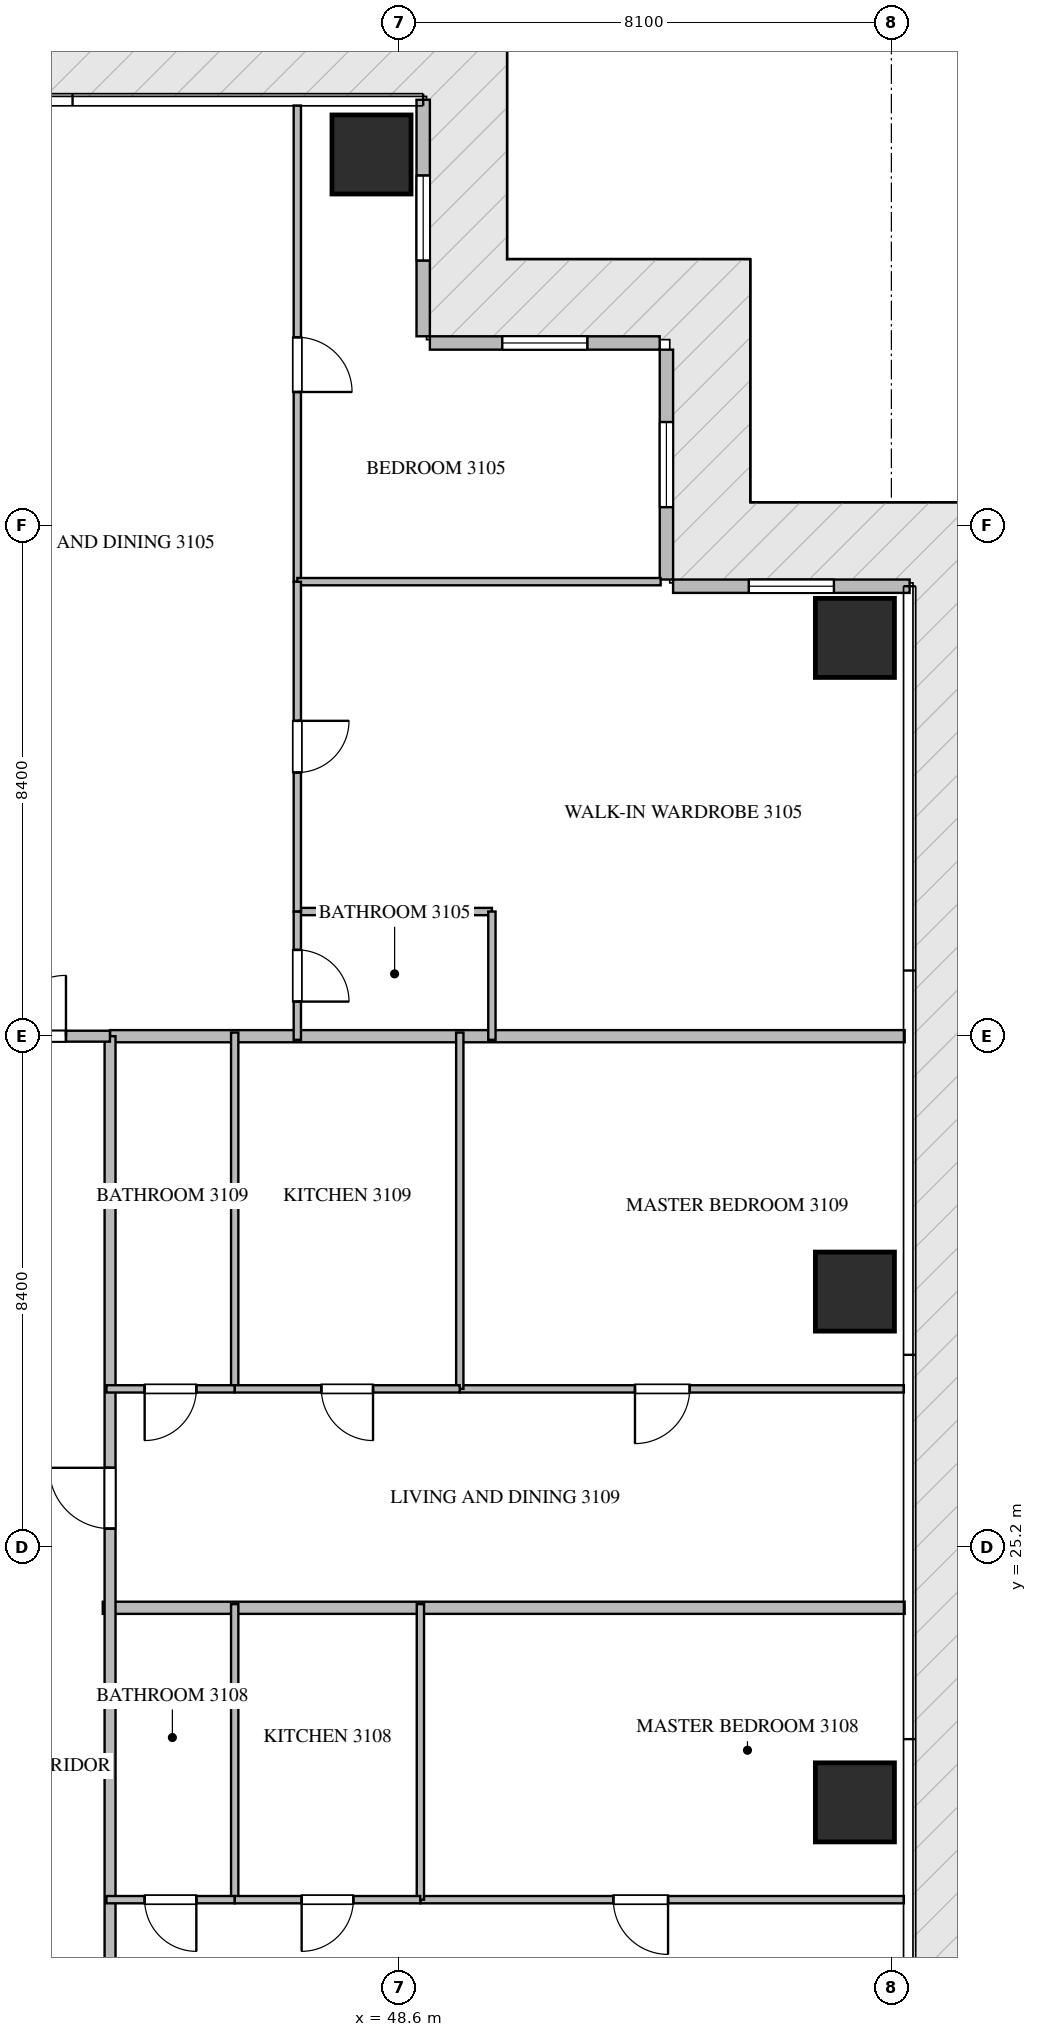
"""IFC4 building model, lengths in metres.
Left out: names, types, materials, properties, quantities, classifications, styles, units other than length and angle.
Written with IfcOpenShell. Run it as: python <this file> out.ifc"""

import sys

from ifc_helpers import new_model, si_unit, direction, frame, frame_2d, origin, origin_2d, place, context, subcontext, project, spatial, rectangle, extrude, source, transform, mapped, element, fill, save


model = new_model("IFC4")
c1 = context("Model", 3, precision=1e-05, world=origin(), true_north=direction((0.0, 1.0)))
c2 = subcontext(c1, "Body", "Model", "MODEL_VIEW")
j1 = project(units=[si_unit("LENGTHUNIT", "METRE"), si_unit("PLANEANGLEUNIT", "RADIAN")], contexts=[c1])
p1 = place(None, origin())
s1 = spatial("IfcSite", under=j1, at=p1, CompositionType="ELEMENT")
p2 = place(p1, origin())
s2 = spatial("IfcBuilding", under=s1, at=p2, CompositionType="ELEMENT")
p3 = place(p2, frame((0.0, 0.0, 127.65)))
s3 = spatial("IfcBuildingStorey", under=s2, at=p3, CompositionType="ELEMENT", Elevation=127.65)
m1 = source(origin(), c2, "Body", "SweptSolid", [
    extrude(rectangle(XDim=1.3, YDim=1.3, at=origin_2d()), origin(), (0.0, 0.0, 1.0), 3.75),
])
for number, where, z_axis, x_axis in (
    (1, (48.15, 48.1, -0.26), (0.0, 0.0, 1.0), (1.0, 0.0, 0.0)),
    (2, (56.1, 21.0, -0.26), (0.0, 0.0, 1.0), (1.0, 0.0, 0.0)),
    (3, (56.1, 29.4, -0.26), (0.0, 0.0, 1.0), (1.0, 0.0, 0.0)),
    (4, (56.1, 40.15, -0.26), (0.0, 0.0, 1.0), (1.0, 0.0, 0.0)),
):
    element("IfcColumn", number, at=place(p3, frame(where, z_axis=z_axis, x_axis=x_axis)), inside=s3, PredefinedType="COLUMN", context=c2, shape_type="MappedRepresentation", body=[
        mapped(m1, transform((0.0, 0.0, 0.0), scale=1.0)),
    ])
p4 = place(p3, frame((57.0, 41.0, 0.0), z_axis=(0.0, 0.0, 1.0), x_axis=(-1.0, 0.0, 0.0)))
e5 = element("IfcWall", 5, at=p4, inside=s3, PredefinedType="ELEMENTEDWALL", context=c2, shape_type="SweptSolid", body=[
    extrude(rectangle(XDim=3.89, YDim=0.22, at=frame_2d((1.945, 0.0))), origin(), (0.0, 0.0, 1.0), 3.475),
])
p5 = place(p4, frame((1.245, 0.0, 0.65)))
e6 = element("IfcOpeningElement", 6, at=p5, cuts=e5, PredefinedType="OPENING", context=c2, shape_type="SweptSolid", body=[
    extrude(rectangle(XDim=1.4, YDim=2.05, at=frame_2d((0.7, 1.025))), frame((0.0, 0.12, 0.0), z_axis=(0.0, -1.0, 0.0), x_axis=(1.0, 0.0, 0.0)), (0.0, 0.0, 1.0), 0.24),
])
p6 = place(p3, frame((53.0, 41.11, 0.0), z_axis=(0.0, 0.0, 1.0), x_axis=(0.0, 1.0, 0.0)))
e7 = element("IfcWall", 7, at=p6, inside=s3, PredefinedType="ELEMENTEDWALL", context=c2, shape_type="SweptSolid", body=[
    extrude(rectangle(XDim=3.78, YDim=0.22, at=frame_2d((1.89, 0.0))), origin(), (0.0, 0.0, 1.0), 3.475),
])
p7 = place(p6, frame((1.19, 0.0, 0.65)))
e8 = element("IfcOpeningElement", 8, at=p7, cuts=e7, PredefinedType="OPENING", context=c2, shape_type="SweptSolid", body=[
    extrude(rectangle(XDim=1.4, YDim=2.05, at=frame_2d((0.7, 1.025))), frame((0.0, 0.12, 0.0), z_axis=(0.0, -1.0, 0.0), x_axis=(1.0, 0.0, 0.0)), (0.0, 0.0, 1.0), 0.24),
])
p8 = place(p3, frame((52.89, 45.0, 0.0), z_axis=(0.0, 0.0, 1.0), x_axis=(-1.0, 0.0, 0.0)))
e9 = element("IfcWall", 9, at=p8, inside=s3, PredefinedType="ELEMENTEDWALL", context=c2, shape_type="SweptSolid", body=[
    extrude(rectangle(XDim=3.78, YDim=0.22, at=frame_2d((1.89, 0.0))), origin(), (0.0, 0.0, 1.0), 3.475),
])
p9 = place(p8, frame((1.19, 0.0, 0.65)))
e10 = element("IfcOpeningElement", 10, at=p9, cuts=e9, PredefinedType="OPENING", context=c2, shape_type="SweptSolid", body=[
    extrude(rectangle(XDim=1.4, YDim=2.05, at=frame_2d((0.7, 1.025))), frame((0.0, 0.12, 0.0), z_axis=(0.0, -1.0, 0.0), x_axis=(1.0, 0.0, 0.0)), (0.0, 0.0, 1.0), 0.24),
])
p10 = place(p3, frame((49.0, 45.11, 0.0), z_axis=(0.0, 0.0, 1.0), x_axis=(0.0, 1.0, 0.0)))
e11 = element("IfcWall", 11, at=p10, inside=s3, PredefinedType="ELEMENTEDWALL", context=c2, shape_type="SweptSolid", body=[
    extrude(rectangle(XDim=3.89, YDim=0.22, at=frame_2d((1.945, 0.0))), origin(), (0.0, 0.0, 1.0), 3.475),
])
p11 = place(p10, frame((1.245, 0.0, 0.65)))
e12 = element("IfcOpeningElement", 12, at=p11, cuts=e11, PredefinedType="OPENING", context=c2, shape_type="SweptSolid", body=[
    extrude(rectangle(XDim=1.4, YDim=2.05, at=frame_2d((0.7, 1.025))), frame((0.0, 0.12, 0.0), z_axis=(0.0, -1.0, 0.0), x_axis=(1.0, 0.0, 0.0)), (0.0, 0.0, 1.0), 0.24),
])
p12 = place(p3, frame((43.73, 24.2, 0.0), z_axis=(0.0, 0.0, 1.0), x_axis=(1.0, 0.0, 0.0)))
e13 = element("IfcWall", 13, at=p12, inside=s3, PredefinedType="PARTITIONING", context=c2, shape_type="SweptSolid", body=[
    extrude(rectangle(XDim=13.188, YDim=0.2, at=frame_2d((6.594, 0.0))), origin(), (0.0, 0.0, 1.0), 3.49),
])
p13 = place(p3, frame((43.85, 33.6, 0.0), z_axis=(0.0, 0.0, 1.0), x_axis=(1.0, 0.0, 0.0)))
e14 = element("IfcWall", 14, at=p13, inside=s3, PredefinedType="PARTITIONING", context=c2, shape_type="SweptSolid", body=[
    extrude(rectangle(XDim=13.068, YDim=0.2, at=frame_2d((6.534, 0.0))), origin(), (0.0, 0.0, 1.0), 3.49),
])
p14 = place(p3, frame((43.85, 14.9, 0.0), z_axis=(0.0, 0.0, 1.0), x_axis=(0.0, 1.0, 0.0)))
e15 = element("IfcWall", 15, at=p14, inside=s3, PredefinedType="PARTITIONING", context=c2, shape_type="SweptSolid", body=[
    extrude(rectangle(XDim=18.7, YDim=0.18, at=frame_2d((9.35, 0.0))), origin(), (0.0, 0.0, 1.0), 3.49),
])
p15 = place(p14, frame((1.805, 0.0, 0.0)))
e16 = element("IfcOpeningElement", 16, at=p15, cuts=e15, PredefinedType="OPENING", context=c2, shape_type="SweptSolid", body=[
    extrude(rectangle(XDim=1.0, YDim=2.15, at=frame_2d((0.5, 1.075))), frame((0.0, 0.1, 0.0), z_axis=(0.0, -1.0, 0.0), x_axis=(1.0, 0.0, 0.0)), (0.0, 0.0, 1.0), 0.2),
])
p16 = place(p14, frame((10.602, 0.0, 0.0)))
e17 = element("IfcOpeningElement", 17, at=p16, cuts=e15, PredefinedType="OPENING", context=c2, shape_type="SweptSolid", body=[
    extrude(rectangle(XDim=1.0, YDim=2.15, at=frame_2d((0.5, 1.075))), frame((0.0, 0.1, 0.0), z_axis=(0.0, -1.0, 0.0), x_axis=(1.0, 0.0, 0.0)), (0.0, 0.0, 1.0), 0.2),
])
p17 = place(p3, frame((41.402, 33.6, 0.0), z_axis=(0.0, 0.0, 1.0), x_axis=(1.0, 0.0, 0.0)))
e18 = element("IfcWall", 18, at=p17, inside=s3, PredefinedType="PARTITIONING", context=c2, shape_type="SweptSolid", body=[
    extrude(rectangle(XDim=2.446, YDim=0.18, at=frame_2d((1.223, 0.0))), origin(), (0.0, 0.0, 1.0), 3.49),
])
p18 = place(p17, frame((0.723, 0.0, 0.0)))
e19 = element("IfcOpeningElement", 19, at=p18, cuts=e18, PredefinedType="OPENING", context=c2, shape_type="SweptSolid", body=[
    extrude(rectangle(XDim=1.0, YDim=2.15, at=frame_2d((0.5, 1.075))), frame((0.0, 0.1, 0.0), z_axis=(0.0, -1.0, 0.0), x_axis=(1.0, 0.0, 0.0)), (0.0, 0.0, 1.0), 0.2),
])
p19 = place(p3, frame((46.93, 48.905, 0.0), z_axis=(0.0, 0.0, 1.0), x_axis=(0.0, -1.0, 0.0)))
e20 = element("IfcWall", 20, at=p19, inside=s3, PredefinedType="PARTITIONING", context=c2, shape_type="SweptSolid", body=[
    extrude(rectangle(XDim=7.83, YDim=0.12, at=frame_2d((3.915, 0.0))), origin(), (0.0, 0.0, 1.0), 3.49),
])
p20 = place(p19, frame((3.811, 0.0, 0.0)))
e21 = element("IfcOpeningElement", 21, at=p20, cuts=e20, PredefinedType="OPENING", context=c2, shape_type="SweptSolid", body=[
    extrude(rectangle(XDim=0.9, YDim=2.1, at=frame_2d((0.45, 1.05))), frame((0.0, 0.07, 0.0), z_axis=(0.0, -1.0, 0.0), x_axis=(1.0, 0.0, 0.0)), (0.0, 0.0, 1.0), 0.14),
])
p21 = place(p3, frame((46.93, 41.075, 0.0), z_axis=(0.0, 0.0, 1.0), x_axis=(1.0, 0.0, 0.0)))
e22 = element("IfcWall", 22, at=p21, inside=s3, PredefinedType="PARTITIONING", context=c2, shape_type="SweptSolid", body=[
    extrude(rectangle(XDim=5.975, YDim=0.12, at=frame_2d((2.988, 0.0))), origin(), (0.0, 0.0, 1.0), 3.49),
])
p22 = place(p3, frame((46.93, 35.65, 0.0), z_axis=(0.0, 0.0, 1.0), x_axis=(1.0, 0.0, 0.0)))
e23 = element("IfcWall", 23, at=p22, inside=s3, PredefinedType="PARTITIONING", context=c2, shape_type="SweptSolid", body=[
    extrude(rectangle(XDim=3.2, YDim=0.12, at=frame_2d((1.6, 0.0))), origin(), (0.0, 0.0, 1.0), 3.49),
])
p23 = place(p3, frame((50.13, 35.65, 0.0), z_axis=(0.0, 0.0, 1.0), x_axis=(0.0, -1.0, 0.0)))
e24 = element("IfcWall", 24, at=p23, inside=s3, PredefinedType="PARTITIONING", context=c2, shape_type="SweptSolid", body=[
    extrude(rectangle(XDim=2.11, YDim=0.12, at=frame_2d((1.055, 0.0))), origin(), (0.0, 0.0, 1.0), 3.49),
])
p24 = place(p3, frame((46.93, 41.073, 0.0), z_axis=(0.0, 0.0, 1.0), x_axis=(0.0, -1.0, 0.0)))
e25 = element("IfcWall", 25, at=p24, inside=s3, PredefinedType="PARTITIONING", context=c2, shape_type="SweptSolid", body=[
    extrude(rectangle(XDim=5.423, YDim=0.12, at=frame_2d((2.711, 0.0))), origin(), (0.0, 0.0, 1.0), 3.49),
])
p25 = place(p24, frame((2.287, 0.0, 0.0)))
e26 = element("IfcOpeningElement", 26, at=p25, cuts=e25, PredefinedType="OPENING", context=c2, shape_type="SweptSolid", body=[
    extrude(rectangle(XDim=0.85, YDim=2.1, at=frame_2d((0.425, 1.05))), frame((0.0, 0.07, 0.0), z_axis=(0.0, -1.0, 0.0), x_axis=(1.0, 0.0, 0.0)), (0.0, 0.0, 1.0), 0.14),
])
p26 = place(p3, frame((46.93, 35.648, 0.0), z_axis=(0.0, 0.0, 1.0), x_axis=(0.0, -1.0, 0.0)))
e27 = element("IfcWall", 27, at=p26, inside=s3, PredefinedType="PARTITIONING", context=c2, shape_type="SweptSolid", body=[
    extrude(rectangle(XDim=2.108, YDim=0.12, at=frame_2d((1.054, 0.0))), origin(), (0.0, 0.0, 1.0), 3.49),
])
p27 = place(p26, frame((0.629, 0.0, 0.0)))
e28 = element("IfcOpeningElement", 28, at=p27, cuts=e27, PredefinedType="OPENING", context=c2, shape_type="SweptSolid", body=[
    extrude(rectangle(XDim=0.85, YDim=2.1, at=frame_2d((0.425, 1.05))), frame((0.0, 0.07, 0.0), z_axis=(0.0, -1.0, 0.0), x_axis=(1.0, 0.0, 0.0)), (0.0, 0.0, 1.0), 0.14),
])
p28 = place(p3, frame((56.905, 19.4, 0.0), z_axis=(0.0, 0.0, 1.0), x_axis=(-1.0, 0.0, 0.0)))
e29 = element("IfcWall", 29, at=p28, inside=s3, PredefinedType="PARTITIONING", context=c2, shape_type="SweptSolid", body=[
    extrude(rectangle(XDim=7.951, YDim=0.12, at=frame_2d((3.976, 0.0))), origin(), (0.0, 0.0, 1.0), 3.49),
])
p29 = place(p28, frame((3.878, 0.0, 0.0)))
e30 = element("IfcOpeningElement", 30, at=p29, cuts=e29, PredefinedType="OPENING", context=c2, shape_type="SweptSolid", body=[
    extrude(rectangle(XDim=0.9, YDim=2.1, at=frame_2d((0.45, 1.05))), frame((0.0, 0.07, 0.0), z_axis=(0.0, -1.0, 0.0), x_axis=(1.0, 0.0, 0.0)), (0.0, 0.0, 1.0), 0.14),
])
for number, where, z_axis, x_axis in (
    (31, (48.954, 19.4, 0.0), (0.0, 0.0, 1.0), (0.0, 1.0, 0.0)),
    (32, (45.9, 19.4, 0.0), (0.0, 0.0, 1.0), (0.0, 1.0, 0.0)),
):
    element("IfcWall", number, at=place(p3, frame(where, z_axis=z_axis, x_axis=x_axis)), inside=s3, PredefinedType="PARTITIONING", context=c2, shape_type="SweptSolid", body=[
        extrude(rectangle(XDim=4.86, YDim=0.12, at=frame_2d((2.43, 0.0))), origin(), (0.0, 0.0, 1.0), 3.49),
    ])
p30 = place(p3, frame((48.952, 19.4, 0.0), z_axis=(0.0, 0.0, 1.0), x_axis=(-1.0, 0.0, 0.0)))
e33 = element("IfcWall", 33, at=p30, inside=s3, PredefinedType="PARTITIONING", context=c2, shape_type="SweptSolid", body=[
    extrude(rectangle(XDim=3.052, YDim=0.12, at=frame_2d((1.526, 0.0))), origin(), (0.0, 0.0, 1.0), 3.49),
])
p31 = place(p30, frame((1.101, 0.0, 0.0)))
e34 = element("IfcOpeningElement", 34, at=p31, cuts=e33, PredefinedType="OPENING", context=c2, shape_type="SweptSolid", body=[
    extrude(rectangle(XDim=0.85, YDim=2.1, at=frame_2d((0.425, 1.05))), frame((0.0, 0.07, 0.0), z_axis=(0.0, -1.0, 0.0), x_axis=(1.0, 0.0, 0.0)), (0.0, 0.0, 1.0), 0.14),
])
p32 = place(p3, frame((45.898, 19.4, 0.0), z_axis=(0.0, 0.0, 1.0), x_axis=(-1.0, 0.0, 0.0)))
e35 = element("IfcWall", 35, at=p32, inside=s3, PredefinedType="PARTITIONING", context=c2, shape_type="SweptSolid", body=[
    extrude(rectangle(XDim=2.108, YDim=0.12, at=frame_2d((1.054, 0.0))), origin(), (0.0, 0.0, 1.0), 3.49),
])
p33 = place(p32, frame((0.629, 0.0, 0.0)))
e36 = element("IfcOpeningElement", 36, at=p33, cuts=e35, PredefinedType="OPENING", context=c2, shape_type="SweptSolid", body=[
    extrude(rectangle(XDim=0.85, YDim=2.1, at=frame_2d((0.425, 1.05))), frame((0.0, 0.07, 0.0), z_axis=(0.0, -1.0, 0.0), x_axis=(1.0, 0.0, 0.0)), (0.0, 0.0, 1.0), 0.14),
])
p34 = place(p3, frame((56.905, 27.8, 0.0), z_axis=(0.0, 0.0, 1.0), x_axis=(-1.0, 0.0, 0.0)))
e37 = element("IfcWall", 37, at=p34, inside=s3, PredefinedType="PARTITIONING", context=c2, shape_type="SweptSolid", body=[
    extrude(rectangle(XDim=7.303, YDim=0.12, at=frame_2d((3.651, 0.0))), origin(), (0.0, 0.0, 1.0), 3.49),
])
p35 = place(p34, frame((3.522, 0.0, 0.0)))
e38 = element("IfcOpeningElement", 38, at=p35, cuts=e37, PredefinedType="OPENING", context=c2, shape_type="SweptSolid", body=[
    extrude(rectangle(XDim=0.9, YDim=2.1, at=frame_2d((0.45, 1.05))), frame((0.0, 0.07, 0.0), z_axis=(0.0, -1.0, 0.0), x_axis=(1.0, 0.0, 0.0)), (0.0, 0.0, 1.0), 0.14),
])
for number, where, z_axis, x_axis in (
    (39, (49.602, 27.8, 0.0), (0.0, 0.0, 1.0), (0.0, 1.0, 0.0)),
    (40, (45.9, 27.8, 0.0), (0.0, 0.0, 1.0), (0.0, 1.0, 0.0)),
):
    element("IfcWall", number, at=place(p3, frame(where, z_axis=z_axis, x_axis=x_axis)), inside=s3, PredefinedType="PARTITIONING", context=c2, shape_type="SweptSolid", body=[
        extrude(rectangle(XDim=5.86, YDim=0.12, at=frame_2d((2.93, 0.0))), origin(), (0.0, 0.0, 1.0), 3.49),
    ])
p36 = place(p3, frame((49.6, 27.8, 0.0), z_axis=(0.0, 0.0, 1.0), x_axis=(-1.0, 0.0, 0.0)))
e41 = element("IfcWall", 41, at=p36, inside=s3, PredefinedType="PARTITIONING", context=c2, shape_type="SweptSolid", body=[
    extrude(rectangle(XDim=3.7, YDim=0.12, at=frame_2d((1.85, 0.0))), origin(), (0.0, 0.0, 1.0), 3.49),
])
p37 = place(p36, frame((1.425, 0.0, 0.0)))
e42 = element("IfcOpeningElement", 42, at=p37, cuts=e41, PredefinedType="OPENING", context=c2, shape_type="SweptSolid", body=[
    extrude(rectangle(XDim=0.85, YDim=2.1, at=frame_2d((0.425, 1.05))), frame((0.0, 0.07, 0.0), z_axis=(0.0, -1.0, 0.0), x_axis=(1.0, 0.0, 0.0)), (0.0, 0.0, 1.0), 0.14),
])
p38 = place(p3, frame((45.898, 27.8, 0.0), z_axis=(0.0, 0.0, 1.0), x_axis=(-1.0, 0.0, 0.0)))
e43 = element("IfcWall", 43, at=p38, inside=s3, PredefinedType="PARTITIONING", context=c2, shape_type="SweptSolid", body=[
    extrude(rectangle(XDim=2.108, YDim=0.12, at=frame_2d((1.054, 0.0))), origin(), (0.0, 0.0, 1.0), 3.49),
])
p39 = place(p38, frame((0.629, 0.0, 0.0)))
e44 = element("IfcOpeningElement", 44, at=p39, cuts=e43, PredefinedType="OPENING", context=c2, shape_type="SweptSolid", body=[
    extrude(rectangle(XDim=0.85, YDim=2.1, at=frame_2d((0.425, 1.05))), frame((0.0, 0.07, 0.0), z_axis=(0.0, -1.0, 0.0), x_axis=(1.0, 0.0, 0.0)), (0.0, 0.0, 1.0), 0.14),
])
m2 = source(origin(), c2, "Body", "SweptSolid", [
    extrude(rectangle(XDim=1.4, YDim=2.05, at=frame_2d((0.7, 1.025))), frame((0.0, 0.03, 0.0), z_axis=(0.0, -1.0, 0.0), x_axis=(1.0, 0.0, 0.0)), (0.0, 0.0, 1.0), 0.06),
])
p40 = place(p5, origin())
e45 = element("IfcWindow", 45, at=p40, inside=s3, PartitioningType="SINGLE_PANEL", PredefinedType="WINDOW", context=c2, shape_type="MappedRepresentation", body=[
    mapped(m2, transform((0.0, 0.0, 0.0), scale=1.0)),
])
fill(e6, e45)
p41 = place(p7, origin())
e46 = element("IfcWindow", 46, at=p41, inside=s3, PartitioningType="SINGLE_PANEL", PredefinedType="WINDOW", context=c2, shape_type="MappedRepresentation", body=[
    mapped(m2, transform((0.0, 0.0, 0.0), scale=1.0)),
])
fill(e8, e46)
p42 = place(p9, origin())
e47 = element("IfcWindow", 47, at=p42, inside=s3, PartitioningType="SINGLE_PANEL", PredefinedType="WINDOW", context=c2, shape_type="MappedRepresentation", body=[
    mapped(m2, transform((0.0, 0.0, 0.0), scale=1.0)),
])
fill(e10, e47)
p43 = place(p11, origin())
e48 = element("IfcWindow", 48, at=p43, inside=s3, PartitioningType="SINGLE_PANEL", PredefinedType="WINDOW", context=c2, shape_type="MappedRepresentation", body=[
    mapped(m2, transform((0.0, 0.0, 0.0), scale=1.0)),
])
fill(e12, e48)
m3 = source(origin(), c2, "Body", "SweptSolid", [
    extrude(rectangle(XDim=1.0, YDim=2.15, at=frame_2d((0.5, 1.075))), frame((0.0, 0.025, 0.0), z_axis=(0.0, -1.0, 0.0), x_axis=(1.0, 0.0, 0.0)), (0.0, 0.0, 1.0), 0.05),
])
p44 = place(p16, origin())
e49 = element("IfcDoor", 49, at=p44, inside=s3, OperationType="SINGLE_SWING_RIGHT", PredefinedType="DOOR", context=c2, shape_type="MappedRepresentation", body=[
    mapped(m3, transform((0.0, 0.0, 0.0), scale=1.0)),
])
fill(e17, e49)
p45 = place(p18, origin())
e50 = element("IfcDoor", 50, at=p45, inside=s3, OperationType="SINGLE_SWING_RIGHT", PredefinedType="DOOR", context=c2, shape_type="MappedRepresentation", body=[
    mapped(m3, transform((0.0, 0.0, 0.0), scale=1.0)),
])
fill(e19, e50)
m4 = source(origin(), c2, "Body", "SweptSolid", [
    extrude(rectangle(XDim=0.9, YDim=2.1, at=frame_2d((0.45, 1.05))), frame((0.0, 0.025, 0.0), z_axis=(0.0, -1.0, 0.0), x_axis=(1.0, 0.0, 0.0)), (0.0, 0.0, 1.0), 0.05),
])
p46 = place(p20, origin())
e51 = element("IfcDoor", 51, at=p46, inside=s3, OperationType="SINGLE_SWING_RIGHT", PredefinedType="DOOR", context=c2, shape_type="MappedRepresentation", body=[
    mapped(m4, transform((0.0, 0.0, 0.0), scale=1.0)),
])
fill(e21, e51)
m5 = source(origin(), c2, "Body", "SweptSolid", [
    extrude(rectangle(XDim=0.85, YDim=2.1, at=frame_2d((0.425, 1.05))), frame((0.0, 0.025, 0.0), z_axis=(0.0, -1.0, 0.0), x_axis=(1.0, 0.0, 0.0)), (0.0, 0.0, 1.0), 0.05),
])
p47 = place(p25, origin())
e52 = element("IfcDoor", 52, at=p47, inside=s3, OperationType="SINGLE_SWING_LEFT", PredefinedType="DOOR", context=c2, shape_type="MappedRepresentation", body=[
    mapped(m5, transform((0.0, 0.0, 0.0), scale=1.0)),
])
fill(e26, e52)
p48 = place(p27, origin())
e53 = element("IfcDoor", 53, at=p48, inside=s3, OperationType="SINGLE_SWING_RIGHT", PredefinedType="DOOR", context=c2, shape_type="MappedRepresentation", body=[
    mapped(m5, transform((0.0, 0.0, 0.0), scale=1.0)),
])
fill(e28, e53)
p49 = place(p29, origin())
e54 = element("IfcDoor", 54, at=p49, inside=s3, OperationType="SINGLE_SWING_LEFT", PredefinedType="DOOR", context=c2, shape_type="MappedRepresentation", body=[
    mapped(m4, transform((0.0, 0.0, 0.0), scale=1.0)),
])
fill(e30, e54)
p50 = place(p31, origin())
e55 = element("IfcDoor", 55, at=p50, inside=s3, OperationType="SINGLE_SWING_RIGHT", PredefinedType="DOOR", context=c2, shape_type="MappedRepresentation", body=[
    mapped(m5, transform((0.0, 0.0, 0.0), scale=1.0)),
])
fill(e34, e55)
p51 = place(p33, origin())
e56 = element("IfcDoor", 56, at=p51, inside=s3, OperationType="SINGLE_SWING_LEFT", PredefinedType="DOOR", context=c2, shape_type="MappedRepresentation", body=[
    mapped(m5, transform((0.0, 0.0, 0.0), scale=1.0)),
])
fill(e36, e56)
p52 = place(p35, origin())
e57 = element("IfcDoor", 57, at=p52, inside=s3, OperationType="SINGLE_SWING_RIGHT", PredefinedType="DOOR", context=c2, shape_type="MappedRepresentation", body=[
    mapped(m4, transform((0.0, 0.0, 0.0), scale=1.0)),
])
fill(e38, e57)
p53 = place(p37, origin())
e58 = element("IfcDoor", 58, at=p53, inside=s3, OperationType="SINGLE_SWING_LEFT", PredefinedType="DOOR", context=c2, shape_type="MappedRepresentation", body=[
    mapped(m5, transform((0.0, 0.0, 0.0), scale=1.0)),
])
fill(e42, e58)
p54 = place(p39, origin())
e59 = element("IfcDoor", 59, at=p54, inside=s3, OperationType="SINGLE_SWING_RIGHT", PredefinedType="DOOR", context=c2, shape_type="MappedRepresentation", body=[
    mapped(m5, transform((0.0, 0.0, 0.0), scale=1.0)),
])
fill(e44, e59)
save(model, sys.argv[1])
